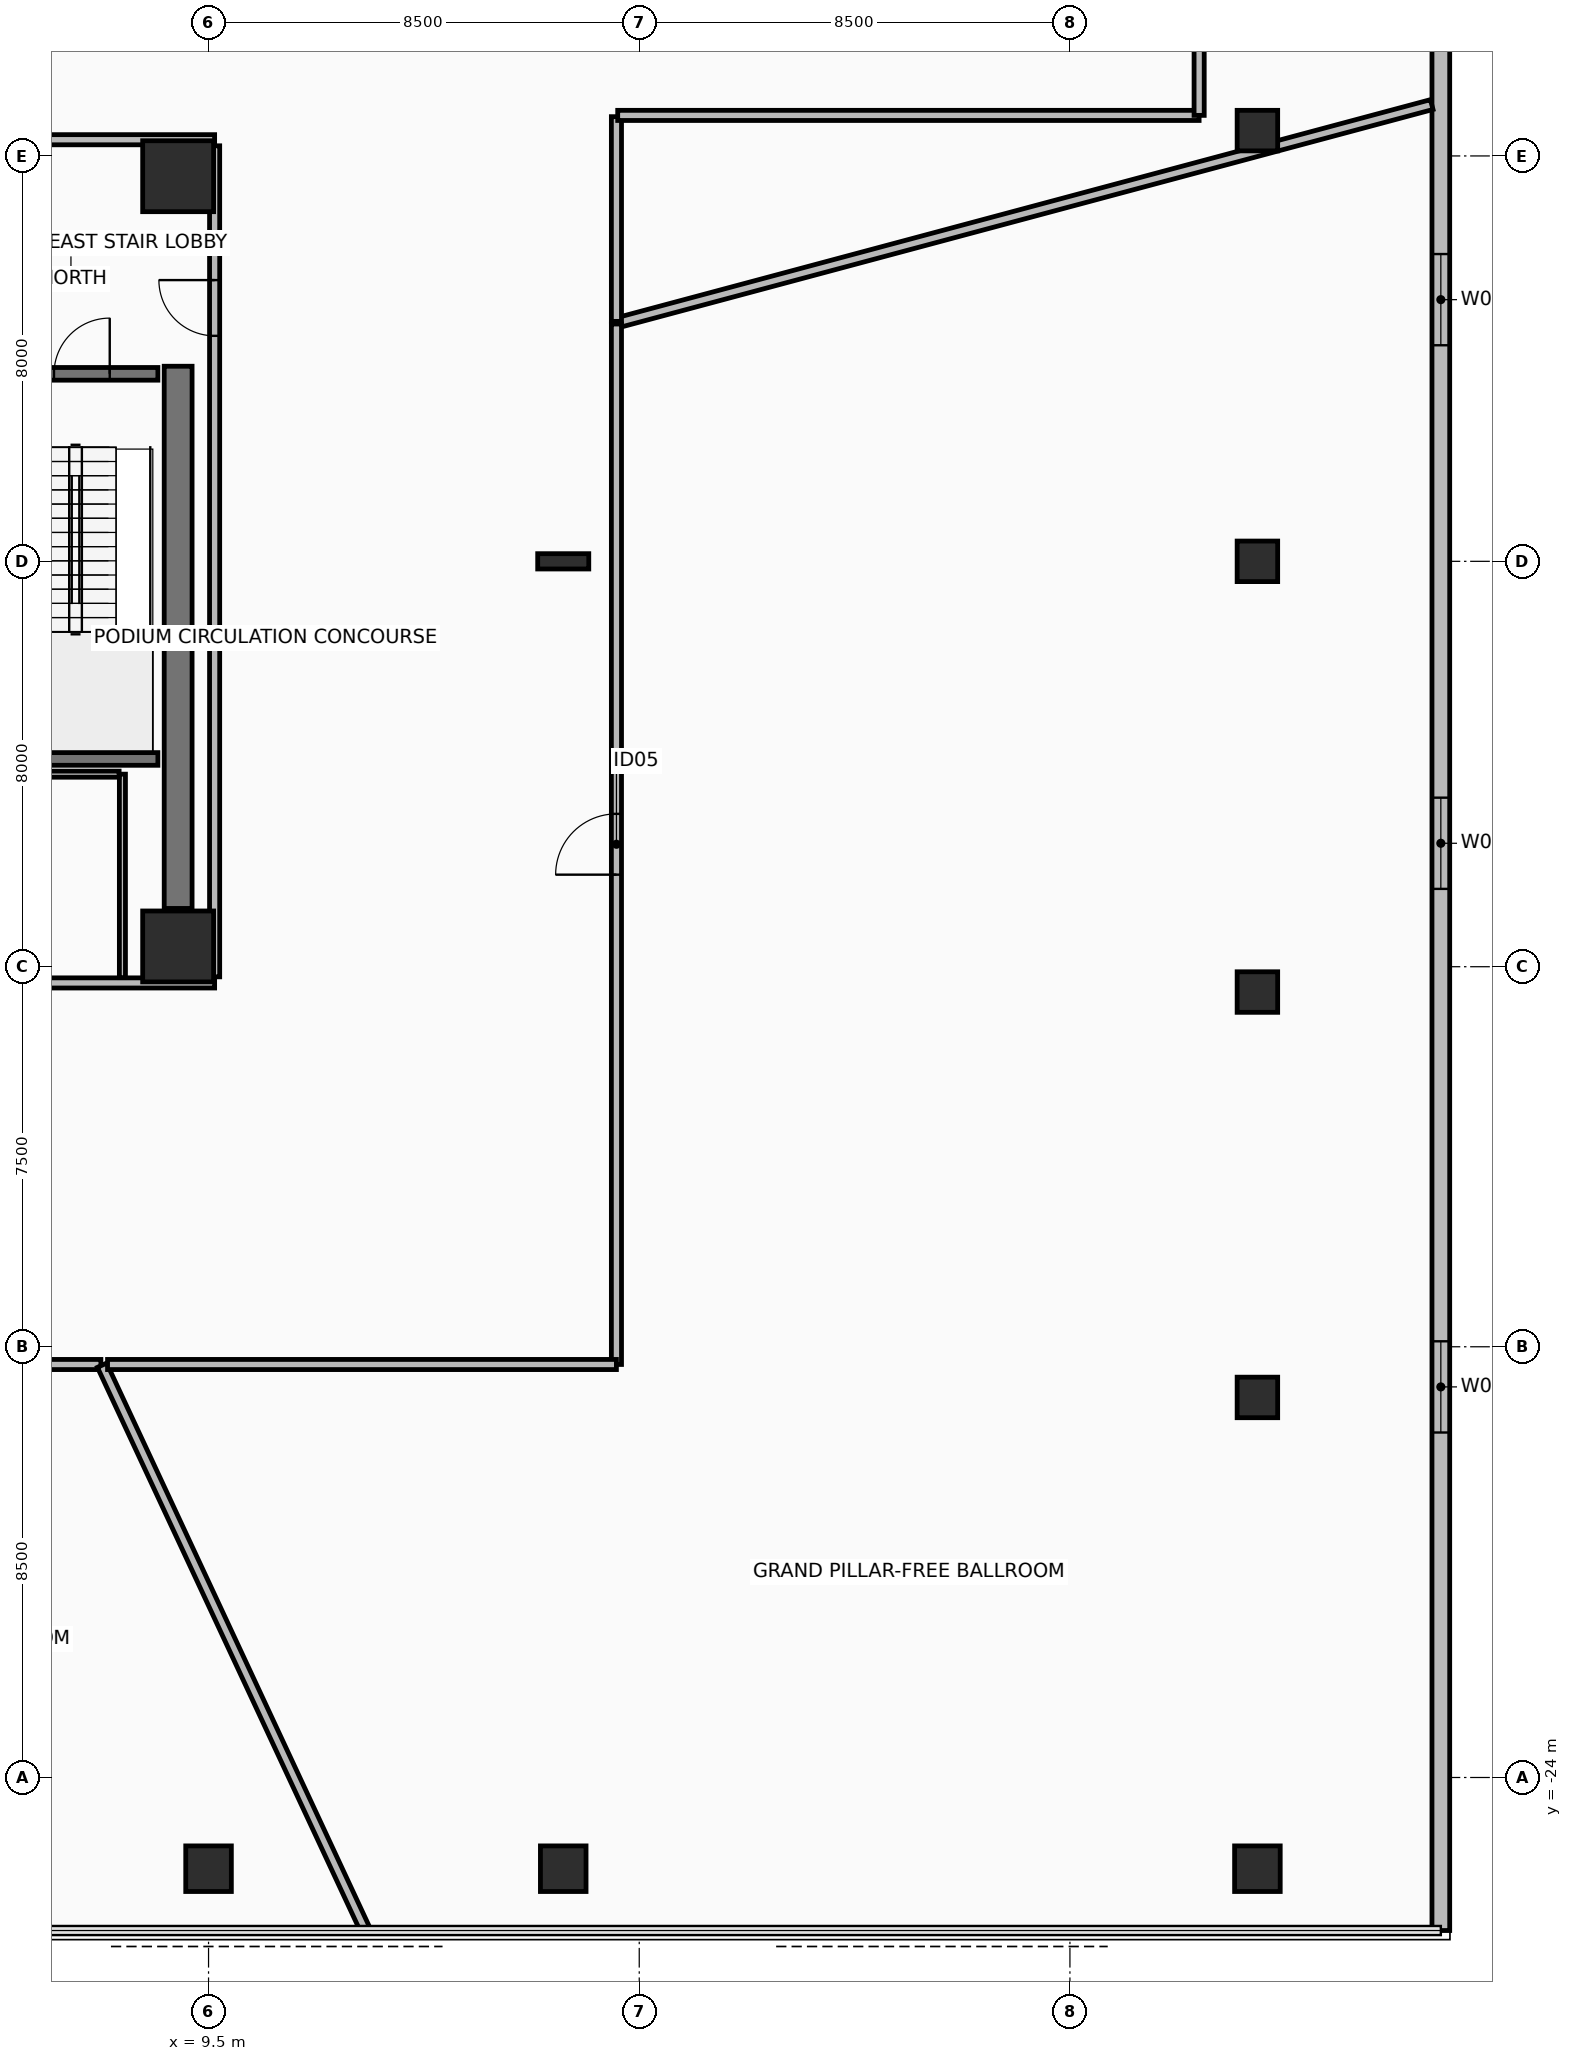
"""IFC4 building model, lengths in metres.
Left out: names, types, materials, properties, quantities, classifications, styles, units other than length and angle.
Written with IfcOpenShell. Run it as: python <this file> out.ifc"""

import sys

from ifc_helpers import new_model, si_unit, direction, frame, frame_2d, origin, origin_2d, place, context, subcontext, project, spatial, rectangle, hollow_rectangle, i_section, extrude, element, fill, save


model = new_model("IFC4")
c1 = context("Model", 3, precision=1e-05, world=origin(), true_north=direction((0.0, 1.0)))
c2 = subcontext(c1, "Body", "Model", "MODEL_VIEW")
j1 = project(units=[si_unit("LENGTHUNIT", "METRE"), si_unit("PLANEANGLEUNIT", "RADIAN")], contexts=[c1])
p1 = place(None, origin())
s1 = spatial("IfcSite", under=j1, at=p1, CompositionType="ELEMENT")
p2 = place(p1, origin())
s2 = spatial("IfcBuilding", under=s1, at=p2, CompositionType="ELEMENT")
p3 = place(p2, frame((0.0, 0.0, 16.5)))
s3 = spatial("IfcBuildingStorey", under=s2, at=p3, CompositionType="ELEMENT", Elevation=16.5)
for number, where, z_axis, x_axis in (
    (1, (8.9, -7.6, 0.0), (0.0, 0.0, 1.0), (1.0, 0.0, 0.0)),
    (2, (8.9, 7.6, 0.0), (0.0, 0.0, 1.0), (1.0, 0.0, 0.0)),
):
    element("IfcColumn", number, at=place(p3, frame(where, z_axis=z_axis, x_axis=x_axis)), inside=s3, PredefinedType="COLUMN", context=c2, shape_type="SweptSolid", body=[
        extrude(rectangle(XDim=1.4, YDim=1.4, at=origin_2d()), origin(), (0.0, 0.0, 1.0), 5.0),
    ])
for number, where, z_axis, x_axis in (
    (3, (9.5, -25.8, 0.0), (0.0, 0.0, 1.0), (1.0, 0.0, 0.0)),
    (4, (16.5, -25.8, 0.0), (0.0, 0.0, 1.0), (1.0, 0.0, 0.0)),
    (5, (30.2, -25.8, 0.0), (0.0, 0.0, 1.0), (1.0, 0.0, 0.0)),
):
    element("IfcColumn", number, at=place(p3, frame(where, z_axis=z_axis, x_axis=x_axis)), inside=s3, PredefinedType="COLUMN", context=c2, shape_type="SweptSolid", body=[
        extrude(hollow_rectangle(XDim=0.9, YDim=0.9, WallThickness=0.05, at=origin_2d()), origin(), (0.0, 0.0, 1.0), 5.0),
    ])
for number, where, z_axis, x_axis in (
    (6, (30.2, -16.5, 0.0), (0.0, 0.0, 1.0), (1.0, 0.0, 0.0)),
    (7, (30.2, -8.5, 0.0), (0.0, 0.0, 1.0), (1.0, 0.0, 0.0)),
    (8, (30.2, 0.0, 0.0), (0.0, 0.0, 1.0), (1.0, 0.0, 0.0)),
    (9, (30.2, 8.5, 0.0), (0.0, 0.0, 1.0), (1.0, 0.0, 0.0)),
):
    element("IfcColumn", number, at=place(p3, frame(where, z_axis=z_axis, x_axis=x_axis)), inside=s3, PredefinedType="COLUMN", context=c2, shape_type="SweptSolid", body=[
        extrude(hollow_rectangle(XDim=0.8, YDim=0.8, WallThickness=0.045, at=origin_2d()), origin(), (0.0, 0.0, 1.0), 5.0),
    ])
p4 = place(p3, frame((16.5, 0.0, 0.0), z_axis=(0.0, 0.0, 1.0), x_axis=(1.0, 0.0, 0.0)))
e10 = element("IfcColumn", 10, at=p4, inside=s3, PredefinedType="COLUMN", context=c2, shape_type="SweptSolid", body=[
    extrude(i_section(OverallWidth=0.302, OverallDepth=1.008, WebThickness=0.021, FlangeThickness=0.04, at=origin_2d()), origin(), (0.0, 0.0, 1.0), 5.0),
])
p5 = place(p3, frame((33.82, -27.02, 0.0), z_axis=(0.0, 0.0, 1.0), x_axis=(0.0, 1.0, 0.0)))
e11 = element("IfcWall", 11, at=p5, inside=s3, PredefinedType="STANDARD", context=c2, shape_type="SweptSolid", body=[
    extrude(rectangle(XDim=53.64, YDim=0.35, at=frame_2d((26.82, 0.0))), origin(), (0.0, 0.0, 1.0), 4.74),
])
p6 = place(p5, frame((9.828, 0.0, 0.95)))
e12 = element("IfcOpeningElement", 12, at=p6, cuts=e11, PredefinedType="OPENING", context=c2, shape_type="SweptSolid", body=[
    extrude(rectangle(XDim=1.8, YDim=2.2, at=frame_2d((0.9, 1.1))), frame((0.0, 0.185, 0.0), z_axis=(0.0, -1.0, 0.0), x_axis=(1.0, 0.0, 0.0)), (0.0, 0.0, 1.0), 0.37),
])
p7 = place(p5, frame((20.556, 0.0, 0.95)))
e13 = element("IfcOpeningElement", 13, at=p7, cuts=e11, PredefinedType="OPENING", context=c2, shape_type="SweptSolid", body=[
    extrude(rectangle(XDim=1.8, YDim=2.2, at=frame_2d((0.9, 1.1))), frame((0.0, 0.185, 0.0), z_axis=(0.0, -1.0, 0.0), x_axis=(1.0, 0.0, 0.0)), (0.0, 0.0, 1.0), 0.37),
])
p8 = place(p5, frame((31.284, 0.0, 0.95)))
e14 = element("IfcOpeningElement", 14, at=p8, cuts=e11, PredefinedType="OPENING", context=c2, shape_type="SweptSolid", body=[
    extrude(rectangle(XDim=1.8, YDim=2.2, at=frame_2d((0.9, 1.1))), frame((0.0, 0.185, 0.0), z_axis=(0.0, -1.0, 0.0), x_axis=(1.0, 0.0, 0.0)), (0.0, 0.0, 1.0), 0.37),
])
p9 = place(p5, frame((42.012, 0.0, 0.95)))
e15 = element("IfcOpeningElement", 15, at=p9, cuts=e11, PredefinedType="OPENING", context=c2, shape_type="SweptSolid", body=[
    extrude(rectangle(XDim=1.8, YDim=2.2, at=frame_2d((0.9, 1.1))), frame((0.0, 0.185, 0.0), z_axis=(0.0, -1.0, 0.0), x_axis=(1.0, 0.0, 0.0)), (0.0, 0.0, 1.0), 0.37),
])
p10 = place(p3, frame((8.9, -6.85, 0.0), z_axis=(0.0, 0.0, 1.0), x_axis=(0.0, 1.0, 0.0)))
e16 = element("IfcWall", 16, at=p10, inside=s3, PredefinedType="SHEAR", context=c2, shape_type="SweptSolid", body=[
    extrude(rectangle(XDim=10.7, YDim=0.55, at=frame_2d((5.35, 0.0))), origin(), (0.0, 0.0, 1.0), 4.74),
])
p11 = place(p3, frame((-9.62, -8.32, 0.0), z_axis=(0.0, 0.0, 1.0), x_axis=(1.0, 0.0, 0.0)))
e17 = element("IfcWall", 17, at=p11, inside=s3, PredefinedType="PARTITIONING", context=c2, shape_type="SweptSolid", body=[
    extrude(rectangle(XDim=19.24, YDim=0.2, at=frame_2d((9.62, 0.0))), origin(), (0.0, 0.0, 1.0), 3.135),
])
p12 = place(p11, frame((15.02, 0.0, 0.0)))
e18 = element("IfcOpeningElement", 18, at=p12, cuts=e17, PredefinedType="OPENING", context=c2, shape_type="SweptSolid", body=[
    extrude(rectangle(XDim=0.9, YDim=2.1, at=frame_2d((0.45, 1.05))), frame((0.0, 0.11, 0.0), z_axis=(0.0, -1.0, 0.0), x_axis=(1.0, 0.0, 0.0)), (0.0, 0.0, 1.0), 0.22),
])
p13 = place(p3, frame((9.62, 8.32, 0.0), z_axis=(0.0, 0.0, 1.0), x_axis=(-1.0, 0.0, 0.0)))
e19 = element("IfcWall", 19, at=p13, inside=s3, PredefinedType="PARTITIONING", context=c2, shape_type="SweptSolid", body=[
    extrude(rectangle(XDim=19.24, YDim=0.2, at=frame_2d((9.62, 0.0))), origin(), (0.0, 0.0, 1.0), 3.135),
])
p14 = place(p13, frame((14.22, 0.0, 0.0)))
e20 = element("IfcOpeningElement", 20, at=p14, cuts=e19, PredefinedType="OPENING", context=c2, shape_type="SweptSolid", body=[
    extrude(rectangle(XDim=0.9, YDim=2.1, at=frame_2d((0.45, 1.05))), frame((0.0, 0.11, 0.0), z_axis=(0.0, -1.0, 0.0), x_axis=(1.0, 0.0, 0.0)), (0.0, 0.0, 1.0), 0.22),
])
p15 = place(p3, frame((9.62, -8.2, 0.0), z_axis=(0.0, 0.0, 1.0), x_axis=(0.0, 1.0, 0.0)))
e21 = element("IfcWall", 21, at=p15, inside=s3, PredefinedType="PARTITIONING", context=c2, shape_type="SweptSolid", body=[
    extrude(rectangle(XDim=16.4, YDim=0.2, at=frame_2d((8.2, 0.0))), origin(), (0.0, 0.0, 1.0), 3.135),
])
p16 = place(p15, frame((12.65, 0.0, 0.0)))
e22 = element("IfcOpeningElement", 22, at=p16, cuts=e21, PredefinedType="OPENING", context=c2, shape_type="SweptSolid", body=[
    extrude(rectangle(XDim=1.1, YDim=2.15, at=frame_2d((0.55, 1.075))), frame((0.0, 0.11, 0.0), z_axis=(0.0, -1.0, 0.0), x_axis=(1.0, 0.0, 0.0)), (0.0, 0.0, 1.0), 0.22),
])
p17 = place(p3, frame((5.5, 3.7, 0.0), z_axis=(0.0, 0.0, 1.0), x_axis=(1.0, 0.0, 0.0)))
e23 = element("IfcWall", 23, at=p17, inside=s3, PredefinedType="SHEAR", context=c2, shape_type="SweptSolid", body=[
    extrude(rectangle(XDim=3.0, YDim=0.25, at=frame_2d((1.5, 0.0))), origin(), (0.0, 0.0, 1.0), 4.74),
])
p18 = place(p17, frame((0.95, 0.0, 0.0)))
e24 = element("IfcOpeningElement", 24, at=p18, cuts=e23, PredefinedType="OPENING", context=c2, shape_type="SweptSolid", body=[
    extrude(rectangle(XDim=1.1, YDim=2.15, at=frame_2d((0.55, 1.075))), frame((0.0, 0.135, 0.0), z_axis=(0.0, -1.0, 0.0), x_axis=(1.0, 0.0, 0.0)), (0.0, 0.0, 1.0), 0.27),
])
p19 = place(p3, frame((5.5, -3.9, 0.0), z_axis=(0.0, 0.0, 1.0), x_axis=(1.0, 0.0, 0.0)))
e25 = element("IfcWall", 25, at=p19, inside=s3, PredefinedType="SHEAR", context=c2, shape_type="SweptSolid", body=[
    extrude(rectangle(XDim=3.0, YDim=0.25, at=frame_2d((1.5, 0.0))), origin(), (0.0, 0.0, 1.0), 4.74),
])
p20 = place(p3, frame((7.8, -8.215, 0.0), z_axis=(0.0, 0.0, 1.0), x_axis=(0.0, 1.0, 0.0)))
e26 = element("IfcWall", 26, at=p20, inside=s3, PredefinedType="PARTITIONING", context=c2, shape_type="SweptSolid", body=[
    extrude(rectangle(XDim=4.015, YDim=0.12, at=frame_2d((2.008, 0.0))), origin(), (0.0, 0.0, 1.0), 3.935),
])
p21 = place(p3, frame((7.735, -4.2, 0.0), z_axis=(0.0, 0.0, 1.0), x_axis=(-1.0, 0.0, 0.0)))
e27 = element("IfcWall", 27, at=p21, inside=s3, PredefinedType="PARTITIONING", context=c2, shape_type="SweptSolid", body=[
    extrude(rectangle(XDim=3.835, YDim=0.12, at=frame_2d((1.917, 0.0))), origin(), (0.0, 0.0, 1.0), 4.74),
])
p22 = place(p3, frame((33.64, 9.014, 0.0), z_axis=(0.0, 0.0, 1.0), x_axis=(-0.965923469749, -0.25882783967, 0.0)))
e28 = element("IfcWall", 28, at=p22, inside=s3, PredefinedType="PARTITIONING", context=c2, shape_type="SweptSolid", body=[
    extrude(rectangle(XDim=16.625, YDim=0.2, at=frame_2d((8.312, 0.0))), origin(), (0.0, 0.0, 1.0), 3.135),
])
p23 = place(p3, frame((17.55, 4.735, 0.0), z_axis=(0.0, 0.0, 1.0), x_axis=(0.0, 1.0, 0.0)))
e29 = element("IfcWall", 29, at=p23, inside=s3, PredefinedType="PARTITIONING", context=c2, shape_type="SweptSolid", body=[
    extrude(rectangle(XDim=4.04, YDim=0.2, at=frame_2d((2.02, 0.0))), origin(), (0.0, 0.0, 1.0), 3.135),
])
p24 = place(p3, frame((17.575, 8.8, 0.0), z_axis=(0.0, 0.0, 1.0), x_axis=(1.0, 0.0, 0.0)))
e30 = element("IfcWall", 30, at=p24, inside=s3, PredefinedType="PARTITIONING", context=c2, shape_type="SweptSolid", body=[
    extrude(rectangle(XDim=11.474, YDim=0.2, at=frame_2d((5.737, 0.0))), origin(), (0.0, 0.0, 1.0), 3.135),
])
p25 = place(p3, frame((29.05, 8.801, 0.0), z_axis=(0.0, 0.0, 1.0), x_axis=(0.0, 1.0, 0.0)))
e31 = element("IfcWall", 31, at=p25, inside=s3, PredefinedType="PARTITIONING", context=c2, shape_type="SweptSolid", body=[
    extrude(rectangle(XDim=9.649, YDim=0.2, at=frame_2d((4.824, 0.0))), origin(), (0.0, 0.0, 1.0), 3.135),
])
p26 = place(p3, frame((-17.525, -15.85, 0.0), z_axis=(0.0, 0.0, 1.0), x_axis=(1.0, 0.0, 0.0)))
e32 = element("IfcWall", 32, at=p26, inside=s3, PredefinedType="PARTITIONING", context=c2, shape_type="SweptSolid", body=[
    extrude(rectangle(XDim=24.9, YDim=0.2, at=frame_2d((12.45, 0.0))), origin(), (0.0, 0.0, 1.0), 2.935),
])
p27 = place(p26, frame((11.95, 0.0, 0.0)))
e33 = element("IfcOpeningElement", 33, at=p27, cuts=e32, PredefinedType="OPENING", context=c2, shape_type="SweptSolid", body=[
    extrude(rectangle(XDim=1.0, YDim=2.15, at=frame_2d((0.5, 1.075))), frame((0.0, 0.11, 0.0), z_axis=(0.0, -1.0, 0.0), x_axis=(1.0, 0.0, 0.0)), (0.0, 0.0, 1.0), 0.22),
])
p28 = place(p3, frame((7.398, -15.865, 0.0), z_axis=(0.0, 0.0, 1.0), x_axis=(0.422618329775, -0.906307755312, 0.0)))
e34 = element("IfcWall", 34, at=p28, inside=s3, PredefinedType="PARTITIONING", context=c2, shape_type="SweptSolid", body=[
    extrude(rectangle(XDim=12.309, YDim=0.2, at=frame_2d((6.154, 0.0))), origin(), (0.0, 0.0, 1.0), 3.135),
])
p29 = place(p3, frame((17.55, -15.849, 0.0), z_axis=(0.0, 0.0, 1.0), x_axis=(0.0, 1.0, 0.0)))
e35 = element("IfcWall", 35, at=p29, inside=s3, PredefinedType="PARTITIONING", context=c2, shape_type="SweptSolid", body=[
    extrude(rectangle(XDim=20.533, YDim=0.2, at=frame_2d((10.266, 0.0))), origin(), (0.0, 0.0, 1.0), 3.135),
])
p30 = place(p29, frame((9.666, 0.0, 0.0)))
e36 = element("IfcOpeningElement", 36, at=p30, cuts=e35, PredefinedType="OPENING", context=c2, shape_type="SweptSolid", body=[
    extrude(rectangle(XDim=1.2, YDim=2.15, at=frame_2d((0.6, 1.075))), frame((0.0, 0.11, 0.0), z_axis=(0.0, -1.0, 0.0), x_axis=(1.0, 0.0, 0.0)), (0.0, 0.0, 1.0), 0.22),
])
p31 = place(p3, frame((7.507, -15.85, 0.0), z_axis=(0.0, 0.0, 1.0), x_axis=(1.0, 0.0, 0.0)))
e37 = element("IfcWall", 37, at=p31, inside=s3, PredefinedType="PARTITIONING", context=c2, shape_type="SweptSolid", body=[
    extrude(rectangle(XDim=10.042, YDim=0.2, at=frame_2d((5.021, 0.0))), origin(), (0.0, 0.0, 1.0), 2.935),
])
p32 = place(p6, origin())
e38 = element("IfcWindow", 38, at=p32, inside=s3, PartitioningType="SINGLE_PANEL", PredefinedType="WINDOW", context=c2, shape_type="SweptSolid", body=[
    extrude(rectangle(XDim=1.8, YDim=2.2, at=frame_2d((0.9, 1.1))), frame((0.0, 0.03, 0.0), z_axis=(0.0, -1.0, 0.0), x_axis=(1.0, 0.0, 0.0)), (0.0, 0.0, 1.0), 0.06),
])
fill(e12, e38)
p33 = place(p7, origin())
e39 = element("IfcWindow", 39, at=p33, inside=s3, PartitioningType="SINGLE_PANEL", PredefinedType="WINDOW", context=c2, shape_type="SweptSolid", body=[
    extrude(rectangle(XDim=1.8, YDim=2.2, at=frame_2d((0.9, 1.1))), frame((0.0, 0.03, 0.0), z_axis=(0.0, -1.0, 0.0), x_axis=(1.0, 0.0, 0.0)), (0.0, 0.0, 1.0), 0.06),
])
fill(e13, e39)
p34 = place(p8, origin())
e40 = element("IfcWindow", 40, at=p34, inside=s3, PartitioningType="SINGLE_PANEL", PredefinedType="WINDOW", context=c2, shape_type="SweptSolid", body=[
    extrude(rectangle(XDim=1.8, YDim=2.2, at=frame_2d((0.9, 1.1))), frame((0.0, 0.03, 0.0), z_axis=(0.0, -1.0, 0.0), x_axis=(1.0, 0.0, 0.0)), (0.0, 0.0, 1.0), 0.06),
])
fill(e14, e40)
p35 = place(p16, frame((1.1, 0.0, 0.0), z_axis=(0.0, 0.0, 1.0), x_axis=(-1.0, 0.0, 0.0)))
e41 = element("IfcDoor", 41, at=p35, inside=s3, OperationType="SINGLE_SWING_LEFT", PredefinedType="DOOR", context=c2, shape_type="SweptSolid", body=[
    extrude(rectangle(XDim=1.1, YDim=2.15, at=frame_2d((0.55, 1.075))), frame((0.0, 0.025, 0.0), z_axis=(0.0, -1.0, 0.0), x_axis=(1.0, 0.0, 0.0)), (0.0, 0.0, 1.0), 0.05),
])
fill(e22, e41)
p36 = place(p18, frame((1.1, 0.0, 0.0), z_axis=(0.0, 0.0, 1.0), x_axis=(-1.0, 0.0, 0.0)))
e42 = element("IfcDoor", 42, at=p36, inside=s3, OperationType="SINGLE_SWING_LEFT", PredefinedType="DOOR", context=c2, shape_type="SweptSolid", body=[
    extrude(rectangle(XDim=1.1, YDim=2.15, at=frame_2d((0.55, 1.075))), frame((0.0, 0.025, 0.0), z_axis=(0.0, -1.0, 0.0), x_axis=(1.0, 0.0, 0.0)), (0.0, 0.0, 1.0), 0.05),
])
fill(e24, e42)
p37 = place(p30, origin())
e43 = element("IfcDoor", 43, at=p37, inside=s3, OperationType="SINGLE_SWING_LEFT", PredefinedType="DOOR", context=c2, shape_type="SweptSolid", body=[
    extrude(rectangle(XDim=1.2, YDim=2.15, at=frame_2d((0.6, 1.075))), frame((0.0, 0.025, 0.0), z_axis=(0.0, -1.0, 0.0), x_axis=(1.0, 0.0, 0.0)), (0.0, 0.0, 1.0), 0.05),
])
fill(e36, e43)
save(model, sys.argv[1])
